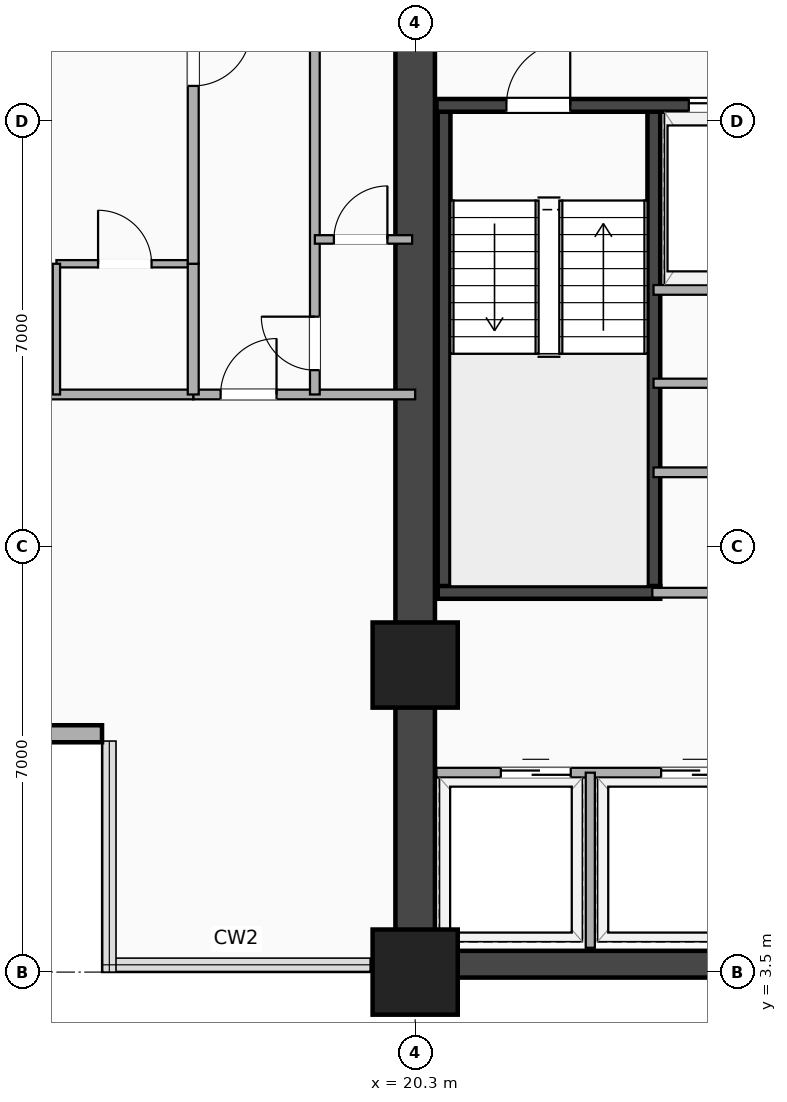
"""IFC4 building model, lengths in metres.
Left out: names, types, materials, properties, quantities, classifications, styles, units other than length and angle.
Written with IfcOpenShell. Run it as: python <this file> out.ifc"""

import sys

from ifc_helpers import new_model, si_unit, direction, frame, frame_2d, origin, origin_2d, place, context, subcontext, project, spatial, rectangle, extrude, element, fill, save


model = new_model("IFC4")
c1 = context("Model", 3, precision=1e-05, world=origin(), true_north=direction((0.0, 1.0)))
c2 = subcontext(c1, "Body", "Model", "MODEL_VIEW")
j1 = project(units=[si_unit("LENGTHUNIT", "METRE"), si_unit("PLANEANGLEUNIT", "RADIAN")], contexts=[c1])
p1 = place(None, origin())
s1 = spatial("IfcSite", under=j1, at=p1, CompositionType="ELEMENT")
p2 = place(p1, origin())
s2 = spatial("IfcBuilding", under=s1, at=p2, CompositionType="ELEMENT")
p3 = place(p2, frame((0.0, 0.0, 50.9)))
s3 = spatial("IfcBuildingStorey", under=s2, at=p3, CompositionType="ELEMENT", Elevation=50.9)
p4 = place(p3, frame((20.3, 3.63, 0.0), z_axis=(0.0, 0.0, 1.0), x_axis=(1.0, 0.0, 0.0)))
e1 = element("IfcWall", 1, at=p4, inside=s3, PredefinedType="SHEAR", context=c2, shape_type="SweptSolid", body=[
    extrude(rectangle(XDim=24.5, YDim=0.44, at=frame_2d((12.25, 0.0))), origin(), (0.0, 0.0, 1.0), 3.22),
])
p5 = place(p3, frame((20.3, 3.5, 0.0), z_axis=(0.0, 0.0, 1.0), x_axis=(0.0, 1.0, 0.0)))
e2 = element("IfcWall", 2, at=p5, inside=s3, PredefinedType="SHEAR", context=c2, shape_type="SweptSolid", body=[
    extrude(rectangle(XDim=16.9, YDim=0.65, at=frame_2d((8.45, 0.0))), origin(), (0.0, 0.0, 1.0), 3.22),
])
for number, where, z_axis, x_axis in (
    (3, (20.775, 9.745, 0.0), (0.0, 0.0, 1.0), (0.0, 1.0, 0.0)),
    (4, (24.225, 9.745, 0.0), (0.0, 0.0, 1.0), (0.0, 1.0, 0.0)),
):
    element("IfcWall", number, at=place(p3, frame(where, z_axis=z_axis, x_axis=x_axis)), inside=s3, PredefinedType="SHEAR", context=c2, shape_type="SweptSolid", body=[
        extrude(rectangle(XDim=8.01, YDim=0.21, at=frame_2d((4.005, 0.0))), origin(), (0.0, 0.0, 1.0), 3.22),
    ])
p6 = place(p3, frame((20.67, 9.745, 0.0), z_axis=(0.0, 0.0, 1.0), x_axis=(1.0, 0.0, 0.0)))
e5 = element("IfcWall", 5, at=p6, inside=s3, PredefinedType="SHEAR", context=c2, shape_type="SweptSolid", body=[
    extrude(rectangle(XDim=3.66, YDim=0.21, at=frame_2d((1.83, 0.0))), origin(), (0.0, 0.0, 1.0), 3.22),
])
p7 = place(p3, frame((20.65, 17.755, 0.0), z_axis=(0.0, 0.0, 1.0), x_axis=(1.0, 0.0, 0.0)))
e6 = element("IfcWall", 6, at=p7, inside=s3, PredefinedType="SHEAR", context=c2, shape_type="SweptSolid", body=[
    extrude(rectangle(XDim=8.3, YDim=0.21, at=frame_2d((4.15, 0.0))), origin(), (0.0, 0.0, 1.0), 3.22),
])
p8 = place(p7, frame((2.2, 0.0, 0.0), z_axis=(0.0, 0.0, 1.0), x_axis=(-1.0, 0.0, 0.0)))
e7 = element("IfcOpeningElement", 7, at=p8, cuts=e6, PredefinedType="OPENING", context=c2, shape_type="SweptSolid", body=[
    extrude(rectangle(XDim=1.05, YDim=2.15, at=frame_2d((0.525, 1.075))), frame((0.0, 0.115, 0.0), z_axis=(0.0, -1.0, 0.0), x_axis=(1.0, 0.0, 0.0)), (0.0, 0.0, 1.0), 0.23),
])
p9 = place(p7, frame((4.15, 0.0, 0.0)))
e8 = element("IfcOpeningElement", 8, at=p9, cuts=e6, PredefinedType="OPENING", context=c2, shape_type="SweptSolid", body=[
    extrude(rectangle(XDim=1.1, YDim=2.18, at=frame_2d((0.55, 1.09))), frame((0.0, 0.115, 0.0), z_axis=(0.0, -1.0, 0.0), x_axis=(1.0, 0.0, 0.0)), (0.0, 0.0, 1.0), 0.23),
])
p10 = place(p7, frame((6.45, 0.0, 0.0)))
e9 = element("IfcOpeningElement", 9, at=p10, cuts=e6, PredefinedType="OPENING", context=c2, shape_type="SweptSolid", body=[
    extrude(rectangle(XDim=1.12, YDim=2.2, at=frame_2d((0.56, 1.1))), frame((0.0, 0.115, 0.0), z_axis=(0.0, -1.0, 0.0), x_axis=(1.0, 0.0, 0.0)), (0.0, 0.0, 1.0), 0.23),
])
for number, where, z_axis, x_axis in (
    (10, (20.3, 3.5, -0.28), (0.0, 0.0, 1.0), (1.0, 0.0, 0.0)),
    (11, (20.3, 8.55, -0.28), (0.0, 0.0, 1.0), (1.0, 0.0, 0.0)),
):
    element("IfcColumn", number, at=place(p3, frame(where, z_axis=z_axis, x_axis=x_axis)), inside=s3, PredefinedType="COLUMN", context=c2, shape_type="SweptSolid", body=[
        extrude(rectangle(XDim=1.4, YDim=1.4, at=origin_2d()), origin(), (0.0, 0.0, 1.0), 3.5),
    ])
p11 = place(p3, frame((11.35, 7.42, 0.0), z_axis=(0.0, 0.0, 1.0), x_axis=(1.0, 0.0, 0.0)))
e12 = element("IfcWall", 12, at=p11, inside=s3, PredefinedType="SOLIDWALL", context=c2, shape_type="SweptSolid", body=[
    extrude(rectangle(XDim=3.8, YDim=0.28, at=frame_2d((1.9, 0.0))), origin(), (0.0, 0.0, 1.0), 3.22),
])
p12 = place(p11, frame((1.025, 0.0, 0.85)))
e13 = element("IfcOpeningElement", 13, at=p12, cuts=e12, PredefinedType="OPENING", context=c2, shape_type="SweptSolid", body=[
    extrude(rectangle(XDim=1.75, YDim=1.65, at=frame_2d((0.875, 0.825))), frame((0.0, 0.15, 0.0), z_axis=(0.0, -1.0, 0.0), x_axis=(1.0, 0.0, 0.0)), (0.0, 0.0, 1.0), 0.3),
])
p13 = place(p3, frame((24.22, 14.72, 0.0), z_axis=(0.0, 0.0, 1.0), x_axis=(1.0, 0.0, 0.0)))
e14 = element("IfcWall", 14, at=p13, inside=s3, PredefinedType="PARTITIONING", context=c2, shape_type="SweptSolid", body=[
    extrude(rectangle(XDim=4.73, YDim=0.16, at=frame_2d((2.365, 0.0))), origin(), (0.0, 0.0, 1.0), 3.22),
])
p14 = place(p3, frame((24.22, 11.72, 0.0), z_axis=(0.0, 0.0, 1.0), x_axis=(1.0, 0.0, 0.0)))
e15 = element("IfcWall", 15, at=p14, inside=s3, PredefinedType="PARTITIONING", context=c2, shape_type="SweptSolid", body=[
    extrude(rectangle(XDim=4.73, YDim=0.16, at=frame_2d((2.365, 0.0))), origin(), (0.0, 0.0, 1.0), 3.22),
])
p15 = place(p14, frame((1.905, 0.0, 0.0)))
e16 = element("IfcOpeningElement", 16, at=p15, cuts=e15, PredefinedType="OPENING", context=c2, shape_type="SweptSolid", body=[
    extrude(rectangle(XDim=0.92, YDim=2.08, at=frame_2d((0.46, 1.04))), frame((0.0, 0.09, 0.0), z_axis=(0.0, -1.0, 0.0), x_axis=(1.0, 0.0, 0.0)), (0.0, 0.0, 1.0), 0.18),
])
p16 = place(p3, frame((24.22, 13.185, 0.0), z_axis=(0.0, 0.0, 1.0), x_axis=(1.0, 0.0, 0.0)))
e17 = element("IfcWall", 17, at=p16, inside=s3, PredefinedType="PARTITIONING", context=c2, shape_type="SweptSolid", body=[
    extrude(rectangle(XDim=4.73, YDim=0.15, at=frame_2d((2.365, 0.0))), origin(), (0.0, 0.0, 1.0), 3.22),
])
p17 = place(p16, frame((1.925, 0.0, 0.0)))
e18 = element("IfcOpeningElement", 18, at=p17, cuts=e17, PredefinedType="OPENING", context=c2, shape_type="SweptSolid", body=[
    extrude(rectangle(XDim=0.88, YDim=2.08, at=frame_2d((0.44, 1.04))), frame((0.0, 0.085, 0.0), z_axis=(0.0, -1.0, 0.0), x_axis=(1.0, 0.0, 0.0)), (0.0, 0.0, 1.0), 0.17),
])
p18 = place(p3, frame((20.65, 6.78, 0.0), z_axis=(0.0, 0.0, 1.0), x_axis=(1.0, 0.0, 0.0)))
e19 = element("IfcWall", 19, at=p18, inside=s3, PredefinedType="PARTITIONING", context=c2, shape_type="SweptSolid", body=[
    extrude(rectangle(XDim=8.3, YDim=0.16, at=frame_2d((4.15, 0.0))), origin(), (0.0, 0.0, 1.0), 2.51),
])
p19 = place(p18, frame((3.695, 0.0, 0.0)))
e20 = element("IfcOpeningElement", 20, at=p19, cuts=e19, PredefinedType="OPENING", context=c2, shape_type="SweptSolid", body=[
    extrude(rectangle(XDim=1.15, YDim=2.2, at=frame_2d((0.575, 1.1))), frame((0.0, 0.09, 0.0), z_axis=(0.0, -1.0, 0.0), x_axis=(1.0, 0.0, 0.0)), (0.0, 0.0, 1.0), 0.18),
])
p20 = place(p18, frame((5.492, 0.0, 0.0)))
e21 = element("IfcOpeningElement", 21, at=p20, cuts=e19, PredefinedType="OPENING", context=c2, shape_type="SweptSolid", body=[
    extrude(rectangle(XDim=1.15, YDim=2.2, at=frame_2d((0.575, 1.1))), frame((0.0, 0.09, 0.0), z_axis=(0.0, -1.0, 0.0), x_axis=(1.0, 0.0, 0.0)), (0.0, 0.0, 1.0), 0.18),
])
p21 = place(p18, frame((1.059, 0.0, 0.0)))
e22 = element("IfcOpeningElement", 22, at=p21, cuts=e19, PredefinedType="OPENING", context=c2, shape_type="SweptSolid", body=[
    extrude(rectangle(XDim=1.15, YDim=2.2, at=frame_2d((0.575, 1.1))), frame((0.0, 0.09, 0.0), z_axis=(0.0, -1.0, 0.0), x_axis=(1.0, 0.0, 0.0)), (0.0, 0.0, 1.0), 0.18),
])
p22 = place(p3, frame((23.18, 3.9, 0.0), z_axis=(0.0, 0.0, 1.0), x_axis=(0.0, 1.0, 0.0)))
e23 = element("IfcWall", 23, at=p22, inside=s3, PredefinedType="PARTITIONING", context=c2, shape_type="SweptSolid", body=[
    extrude(rectangle(XDim=2.88, YDim=0.15, at=frame_2d((1.44, 0.0))), origin(), (0.0, 0.0, 1.0), 3.22),
])
p23 = place(p3, frame((24.2, 9.74, 0.0), z_axis=(0.0, 0.0, 1.0), x_axis=(1.0, 0.0, 0.0)))
e24 = element("IfcWall", 24, at=p23, inside=s3, PredefinedType="PARTITIONING", context=c2, shape_type="SweptSolid", body=[
    extrude(rectangle(XDim=4.8, YDim=0.16, at=frame_2d((2.4, 0.0))), origin(), (0.0, 0.0, 1.0), 3.22),
])
p24 = place(p23, frame((1.85, 0.0, 0.0)))
e25 = element("IfcOpeningElement", 25, at=p24, cuts=e24, PredefinedType="OPENING", context=c2, shape_type="SweptSolid", body=[
    extrude(rectangle(XDim=1.1, YDim=2.15, at=frame_2d((0.55, 1.075))), frame((0.0, 0.09, 0.0), z_axis=(0.0, -1.0, 0.0), x_axis=(1.0, 0.0, 0.0)), (0.0, 0.0, 1.0), 0.18),
])
p25 = place(p3, frame((16.65, 13.0, 0.0), z_axis=(0.0, 0.0, 1.0), x_axis=(1.0, 0.0, 0.0)))
e26 = element("IfcWall", 26, at=p25, inside=s3, PredefinedType="PARTITIONING", context=c2, shape_type="SweptSolid", body=[
    extrude(rectangle(XDim=3.65, YDim=0.16, at=frame_2d((1.825, 0.0))), origin(), (0.0, 0.0, 1.0), 2.51),
])
p26 = place(p25, frame((1.37, 0.0, 0.0), z_axis=(0.0, 0.0, 1.0), x_axis=(-1.0, 0.0, 0.0)))
e27 = element("IfcOpeningElement", 27, at=p26, cuts=e26, PredefinedType="OPENING", context=c2, shape_type="SweptSolid", body=[
    extrude(rectangle(XDim=0.92, YDim=2.08, at=frame_2d((0.46, 1.04))), frame((0.0, 0.09, 0.0), z_axis=(0.0, -1.0, 0.0), x_axis=(1.0, 0.0, 0.0)), (0.0, 0.0, 1.0), 0.18),
])
p27 = place(p3, frame((18.65, 13.0, 0.0), z_axis=(0.0, 0.0, 1.0), x_axis=(0.0, 1.0, 0.0)))
e28 = element("IfcWall", 28, at=p27, inside=s3, PredefinedType="PARTITIONING", context=c2, shape_type="SweptSolid", body=[
    extrude(rectangle(XDim=7.42, YDim=0.16, at=frame_2d((3.71, 0.0))), origin(), (0.0, 0.0, 1.0), 2.51),
])
p28 = place(p27, frame((1.28, 0.0, 0.0), z_axis=(0.0, 0.0, 1.0), x_axis=(-1.0, 0.0, 0.0)))
e29 = element("IfcOpeningElement", 29, at=p28, cuts=e28, PredefinedType="OPENING", context=c2, shape_type="SweptSolid", body=[
    extrude(rectangle(XDim=0.88, YDim=2.08, at=frame_2d((0.44, 1.04))), frame((0.0, 0.09, 0.0), z_axis=(0.0, -1.0, 0.0), x_axis=(1.0, 0.0, 0.0)), (0.0, 0.0, 1.0), 0.18),
])
p29 = place(p3, frame((11.47, 13.0, 0.0), z_axis=(0.0, 0.0, 1.0), x_axis=(1.0, 0.0, 0.0)))
e30 = element("IfcWall", 30, at=p29, inside=s3, PredefinedType="PARTITIONING", context=c2, shape_type="SweptSolid", body=[
    extrude(rectangle(XDim=5.18, YDim=0.16, at=frame_2d((2.59, 0.0))), origin(), (0.0, 0.0, 1.0), 2.583),
])
p30 = place(p3, frame((14.4, 15.15, 0.0), z_axis=(0.0, 0.0, 1.0), x_axis=(1.0, 0.0, 0.0)))
e31 = element("IfcWall", 31, at=p30, inside=s3, PredefinedType="PARTITIONING", context=c2, shape_type="SweptSolid", body=[
    extrude(rectangle(XDim=2.25, YDim=0.12, at=frame_2d((1.125, 0.0))), origin(), (0.0, 0.0, 1.0), 3.22),
])
p31 = place(p30, frame((1.565, 0.0, 0.0), z_axis=(0.0, 0.0, 1.0), x_axis=(-1.0, 0.0, 0.0)))
e32 = element("IfcOpeningElement", 32, at=p31, cuts=e31, PredefinedType="OPENING", context=c2, shape_type="SweptSolid", body=[
    extrude(rectangle(XDim=0.88, YDim=2.08, at=frame_2d((0.44, 1.04))), frame((0.0, 0.07, 0.0), z_axis=(0.0, -1.0, 0.0), x_axis=(1.0, 0.0, 0.0)), (0.0, 0.0, 1.0), 0.14),
])
p32 = place(p3, frame((14.4, 13.0, 0.0), z_axis=(0.0, 0.0, 1.0), x_axis=(0.0, 1.0, 0.0)))
e33 = element("IfcWall", 33, at=p32, inside=s3, PredefinedType="PARTITIONING", context=c2, shape_type="SweptSolid", body=[
    extrude(rectangle(XDim=2.15, YDim=0.12, at=frame_2d((1.075, 0.0))), origin(), (0.0, 0.0, 1.0), 2.902),
])
p33 = place(p3, frame((16.65, 13.0, 0.0), z_axis=(0.0, 0.0, 1.0), x_axis=(0.0, 1.0, 0.0)))
e34 = element("IfcWall", 34, at=p33, inside=s3, PredefinedType="PARTITIONING", context=c2, shape_type="SweptSolid", body=[
    extrude(rectangle(XDim=2.15, YDim=0.18, at=frame_2d((1.075, 0.0))), origin(), (0.0, 0.0, 1.0), 2.902),
])
p34 = place(p3, frame((16.65, 15.15, 0.0), z_axis=(0.0, 0.0, 1.0), x_axis=(0.0, 1.0, 0.0)))
e35 = element("IfcWall", 35, at=p34, inside=s3, PredefinedType="PARTITIONING", context=c2, shape_type="SweptSolid", body=[
    extrude(rectangle(XDim=6.8, YDim=0.18, at=frame_2d((3.4, 0.0))), origin(), (0.0, 0.0, 1.0), 2.51),
])
p35 = place(p34, frame((2.925, 0.0, 0.0)))
e36 = element("IfcOpeningElement", 36, at=p35, cuts=e35, PredefinedType="OPENING", context=c2, shape_type="SweptSolid", body=[
    extrude(rectangle(XDim=0.95, YDim=2.15, at=frame_2d((0.475, 1.075))), frame((0.0, 0.1, 0.0), z_axis=(0.0, -1.0, 0.0), x_axis=(1.0, 0.0, 0.0)), (0.0, 0.0, 1.0), 0.2),
])
p36 = place(p3, frame((18.65, 15.55, 0.0), z_axis=(0.0, 0.0, 1.0), x_axis=(1.0, 0.0, 0.0)))
e37 = element("IfcWall", 37, at=p36, inside=s3, PredefinedType="PARTITIONING", context=c2, shape_type="SweptSolid", body=[
    extrude(rectangle(XDim=1.6, YDim=0.14, at=frame_2d((0.8, 0.0))), origin(), (0.0, 0.0, 1.0), 2.51),
])
p37 = place(p36, frame((1.193, 0.0, 0.0), z_axis=(0.0, 0.0, 1.0), x_axis=(-1.0, 0.0, 0.0)))
e38 = element("IfcOpeningElement", 38, at=p37, cuts=e37, PredefinedType="OPENING", context=c2, shape_type="SweptSolid", body=[
    extrude(rectangle(XDim=0.88, YDim=2.08, at=frame_2d((0.44, 1.04))), frame((0.0, 0.08, 0.0), z_axis=(0.0, -1.0, 0.0), x_axis=(1.0, 0.0, 0.0)), (0.0, 0.0, 1.0), 0.16),
])
p38 = place(p8, origin())
e39 = element("IfcDoor", 39, at=p38, inside=s3, OperationType="SINGLE_SWING_RIGHT", PredefinedType="DOOR", context=c2, shape_type="SweptSolid", body=[
    extrude(rectangle(XDim=1.05, YDim=2.15, at=frame_2d((0.525, 1.075))), frame((0.0, 0.025, 0.0), z_axis=(0.0, -1.0, 0.0), x_axis=(1.0, 0.0, 0.0)), (0.0, 0.0, 1.0), 0.05),
])
fill(e7, e39)
p39 = place(p9, origin())
e40 = element("IfcDoor", 40, at=p39, inside=s3, OperationType="DOUBLE_DOOR_SLIDING", PredefinedType="DOOR", context=c2, shape_type="SweptSolid", body=[
    extrude(rectangle(XDim=1.1, YDim=2.18, at=frame_2d((0.55, 1.09))), frame((0.0, 0.025, 0.0), z_axis=(0.0, -1.0, 0.0), x_axis=(1.0, 0.0, 0.0)), (0.0, 0.0, 1.0), 0.05),
])
fill(e8, e40)
p40 = place(p19, origin())
e41 = element("IfcDoor", 41, at=p40, inside=s3, OperationType="DOUBLE_DOOR_SLIDING", PredefinedType="DOOR", context=c2, shape_type="SweptSolid", body=[
    extrude(rectangle(XDim=1.15, YDim=2.2, at=frame_2d((0.575, 1.1))), frame((0.0, 0.025, 0.0), z_axis=(0.0, -1.0, 0.0), x_axis=(1.0, 0.0, 0.0)), (0.0, 0.0, 1.0), 0.05),
])
fill(e20, e41)
p41 = place(p21, origin())
e42 = element("IfcDoor", 42, at=p41, inside=s3, OperationType="DOUBLE_DOOR_SLIDING", PredefinedType="DOOR", context=c2, shape_type="SweptSolid", body=[
    extrude(rectangle(XDim=1.15, YDim=2.2, at=frame_2d((0.575, 1.1))), frame((0.0, 0.025, 0.0), z_axis=(0.0, -1.0, 0.0), x_axis=(1.0, 0.0, 0.0)), (0.0, 0.0, 1.0), 0.05),
])
fill(e22, e42)
p42 = place(p26, origin())
e43 = element("IfcDoor", 43, at=p42, inside=s3, OperationType="SINGLE_SWING_RIGHT", PredefinedType="DOOR", context=c2, shape_type="SweptSolid", body=[
    extrude(rectangle(XDim=0.92, YDim=2.08, at=frame_2d((0.46, 1.04))), frame((0.0, 0.025, 0.0), z_axis=(0.0, -1.0, 0.0), x_axis=(1.0, 0.0, 0.0)), (0.0, 0.0, 1.0), 0.05),
])
fill(e27, e43)
p43 = place(p28, origin())
e44 = element("IfcDoor", 44, at=p43, inside=s3, OperationType="SINGLE_SWING_RIGHT", PredefinedType="DOOR", context=c2, shape_type="SweptSolid", body=[
    extrude(rectangle(XDim=0.88, YDim=2.08, at=frame_2d((0.44, 1.04))), frame((0.0, 0.025, 0.0), z_axis=(0.0, -1.0, 0.0), x_axis=(1.0, 0.0, 0.0)), (0.0, 0.0, 1.0), 0.05),
])
fill(e29, e44)
p44 = place(p31, origin())
e45 = element("IfcDoor", 45, at=p44, inside=s3, OperationType="SINGLE_SWING_LEFT", PredefinedType="DOOR", context=c2, shape_type="SweptSolid", body=[
    extrude(rectangle(XDim=0.88, YDim=2.08, at=frame_2d((0.44, 1.04))), frame((0.0, 0.025, 0.0), z_axis=(0.0, -1.0, 0.0), x_axis=(1.0, 0.0, 0.0)), (0.0, 0.0, 1.0), 0.05),
])
fill(e32, e45)
p45 = place(p35, origin())
e46 = element("IfcDoor", 46, at=p45, inside=s3, OperationType="SINGLE_SWING_RIGHT", PredefinedType="DOOR", context=c2, shape_type="SweptSolid", body=[
    extrude(rectangle(XDim=0.95, YDim=2.15, at=frame_2d((0.475, 1.075))), frame((0.0, 0.025, 0.0), z_axis=(0.0, -1.0, 0.0), x_axis=(1.0, 0.0, 0.0)), (0.0, 0.0, 1.0), 0.05),
])
fill(e36, e46)
p46 = place(p37, origin())
e47 = element("IfcDoor", 47, at=p46, inside=s3, OperationType="SINGLE_SWING_RIGHT", PredefinedType="DOOR", context=c2, shape_type="SweptSolid", body=[
    extrude(rectangle(XDim=0.88, YDim=2.08, at=frame_2d((0.44, 1.04))), frame((0.0, 0.025, 0.0), z_axis=(0.0, -1.0, 0.0), x_axis=(1.0, 0.0, 0.0)), (0.0, 0.0, 1.0), 0.05),
])
fill(e38, e47)
save(model, sys.argv[1])
